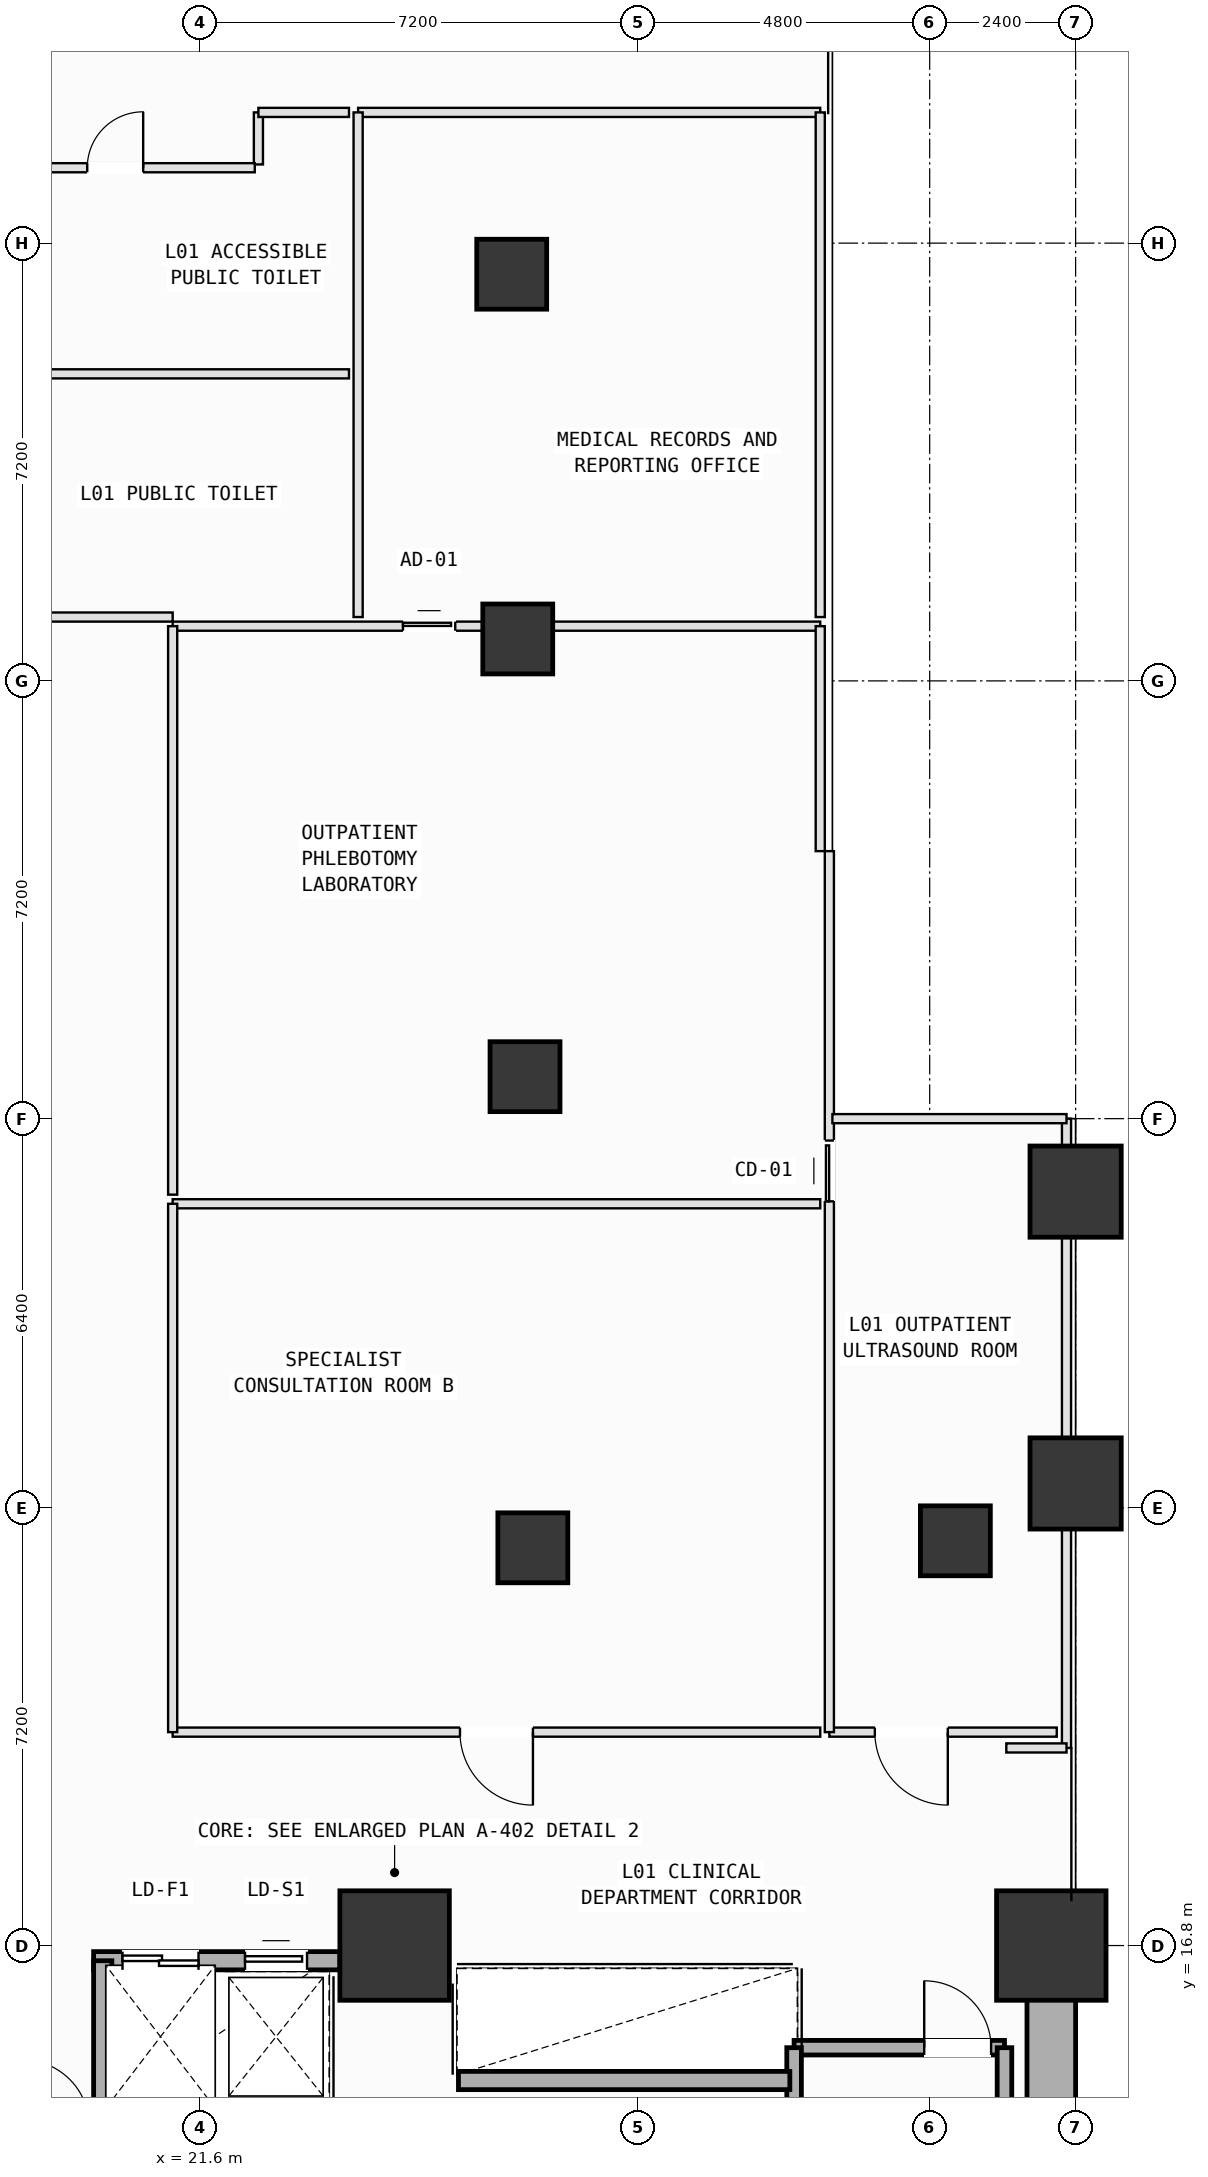
"""IFC4 building model, lengths in metres.
Left out: names, types, materials, properties, quantities, classifications, styles, units other than length and angle.
Written with IfcOpenShell. Run it as: python <this file> out.ifc"""

import sys

from ifc_helpers import new_model, si_unit, direction, frame, frame_2d, origin, origin_2d, place, context, subcontext, project, spatial, rectangle, extrude, element, fill, save


model = new_model("IFC4")
c1 = context("Model", 3, precision=1e-05, world=origin(), true_north=direction((0.0, 1.0)))
c2 = subcontext(c1, "Body", "Model", "MODEL_VIEW")
j1 = project(units=[si_unit("LENGTHUNIT", "METRE"), si_unit("PLANEANGLEUNIT", "RADIAN")], contexts=[c1])
p1 = place(None, origin())
s1 = spatial("IfcSite", under=j1, at=p1, CompositionType="ELEMENT")
p2 = place(p1, origin())
s2 = spatial("IfcBuilding", under=s1, at=p2, CompositionType="ELEMENT")
p3 = place(p2, frame((0.0, 0.0, 5.4)))
s3 = spatial("IfcBuildingStorey", under=s2, at=p3, CompositionType="ELEMENT", Elevation=5.4)
for number, where, z_axis, x_axis in (
    (1, (24.8, 16.8, 0.0), (0.0, 0.0, 1.0), (1.0, 0.0, 0.0)),
    (2, (35.6, 16.8, 0.0), (0.0, 0.0, 1.0), (1.0, 0.0, 0.0)),
):
    element("IfcColumn", number, at=place(p3, frame(where, z_axis=z_axis, x_axis=x_axis)), inside=s3, PredefinedType="COLUMN", context=c2, shape_type="SweptSolid", body=[
        extrude(rectangle(XDim=1.8, YDim=1.8, at=origin_2d()), origin(), (0.0, 0.0, 1.0), 5.4),
    ])
for number, where, z_axis, x_axis in (
    (3, (36.0, 24.4, 0.0), (0.0, 0.0, 1.0), (1.0, 0.0, 0.0)),
    (4, (36.0, 29.2, 0.0), (0.0, 0.0, 1.0), (1.0, 0.0, 0.0)),
):
    element("IfcColumn", number, at=place(p3, frame(where, z_axis=z_axis, x_axis=x_axis)), inside=s3, PredefinedType="PILASTER", context=c2, shape_type="SweptSolid", body=[
        extrude(rectangle(XDim=1.5, YDim=1.5, at=origin_2d()), origin(), (0.0, 0.0, 1.0), 5.4),
    ])
for number, where, z_axis, x_axis in (
    (5, (34.022, 23.457, 0.0), (0.0, 0.0, 1.0), (1.0, 0.0, 0.0)),
    (6, (27.073, 23.342, 0.0), (0.0, 0.0, 1.0), (1.0, 0.0, 0.0)),
    (7, (26.945, 31.091, 0.0), (0.0, 0.0, 1.0), (1.0, 0.0, 0.0)),
    (8, (26.825, 38.29, 0.0), (0.0, 0.0, 1.0), (1.0, 0.0, 0.0)),
    (9, (26.726, 44.289, 0.0), (0.0, 0.0, 1.0), (1.0, 0.0, 0.0)),
):
    element("IfcColumn", number, at=place(p3, frame(where, z_axis=z_axis, x_axis=x_axis)), inside=s3, PredefinedType="COLUMN", context=c2, shape_type="SweptSolid", body=[
        extrude(rectangle(XDim=1.15, YDim=1.15, at=origin_2d()), origin(), (0.0, 0.0, 1.0), 5.4),
    ])
p4 = place(p3, frame((31.37, 15.12, 0.0), z_axis=(0.0, 0.0, 1.0), x_axis=(1.0, 0.0, 0.0)))
e10 = element("IfcWall", 10, at=p4, inside=s3, PredefinedType="SOLIDWALL", context=c2, shape_type="SweptSolid", body=[
    extrude(rectangle(XDim=3.46, YDim=0.24, at=frame_2d((1.73, 0.0))), origin(), (0.0, 0.0, 1.0), 5.15),
])
p5 = place(p4, frame((2.14, 0.0, 0.0)))
e11 = element("IfcOpeningElement", 11, at=p5, cuts=e10, PredefinedType="OPENING", context=c2, shape_type="SweptSolid", body=[
    extrude(rectangle(XDim=1.1, YDim=2.15, at=frame_2d((0.55, 1.075))), frame((0.0, 0.13, 0.0), z_axis=(0.0, -1.0, 0.0), x_axis=(1.0, 0.0, 0.0)), (0.0, 0.0, 1.0), 0.26),
])
for number, where, z_axis, x_axis in (
    (12, (34.83, 15.12, 0.0), (0.0, 0.0, 1.0), (0.0, -1.0, 0.0)),
    (13, (31.37, 8.2, 0.0), (0.0, 0.0, 1.0), (0.0, 1.0, 0.0)),
):
    element("IfcWall", number, at=place(p3, frame(where, z_axis=z_axis, x_axis=x_axis)), inside=s3, PredefinedType="SOLIDWALL", context=c2, shape_type="SweptSolid", body=[
        extrude(rectangle(XDim=6.92, YDim=0.24, at=frame_2d((3.46, 0.0))), origin(), (0.0, 0.0, 1.0), 5.15),
    ])
p6 = place(p3, frame((35.6, 7.8, 0.0), z_axis=(0.0, 0.0, 1.0), x_axis=(0.0, 1.0, 0.0)))
e14 = element("IfcWall", 14, at=p6, inside=s3, PredefinedType="SHEAR", context=c2, shape_type="SweptSolid", body=[
    extrude(rectangle(XDim=9.0, YDim=0.8, at=frame_2d((4.5, 0.0))), origin(), (0.0, 0.0, 1.0), 5.15),
])
p7 = place(p3, frame((19.85, 16.55, 0.0), z_axis=(0.0, 0.0, 1.0), x_axis=(1.0, 0.0, 0.0)))
e15 = element("IfcWall", 15, at=p7, inside=s3, PredefinedType="SOLIDWALL", context=c2, shape_type="SweptSolid", body=[
    extrude(rectangle(XDim=4.05, YDim=0.3, at=frame_2d((2.025, 0.0))), origin(), (0.0, 0.0, 1.0), 5.15),
])
p8 = place(p7, frame((0.475, 0.0, 0.0)))
e16 = element("IfcOpeningElement", 16, at=p8, cuts=e15, PredefinedType="OPENING", context=c2, shape_type="SweptSolid", body=[
    extrude(rectangle(XDim=1.25, YDim=2.18, at=frame_2d((0.625, 1.09))), frame((0.0, 0.16, 0.0), z_axis=(0.0, -1.0, 0.0), x_axis=(1.0, 0.0, 0.0)), (0.0, 0.0, 1.0), 0.32),
])
p9 = place(p7, frame((2.49, 0.0, 0.0)))
e17 = element("IfcOpeningElement", 17, at=p9, cuts=e15, PredefinedType="OPENING", context=c2, shape_type="SweptSolid", body=[
    extrude(rectangle(XDim=1.02, YDim=2.12, at=frame_2d((0.51, 1.06))), frame((0.0, 0.16, 0.0), z_axis=(0.0, -1.0, 0.0), x_axis=(1.0, 0.0, 0.0)), (0.0, 0.0, 1.0), 0.32),
])
p10 = place(p3, frame((20.0, 13.82, 0.0), z_axis=(0.0, 0.0, 1.0), x_axis=(0.0, 1.0, 0.0)))
e18 = element("IfcWall", 18, at=p10, inside=s3, PredefinedType="SOLIDWALL", context=c2, shape_type="SweptSolid", body=[
    extrude(rectangle(XDim=2.73, YDim=0.3, at=frame_2d((1.365, 0.0))), origin(), (0.0, 0.0, 1.0), 5.15),
])
p11 = place(p3, frame((25.85, 14.58, 0.0), z_axis=(0.0, 0.0, 1.0), x_axis=(1.0, 0.0, 0.0)))
e19 = element("IfcWall", 19, at=p11, inside=s3, PredefinedType="SOLIDWALL", context=c2, shape_type="SweptSolid", body=[
    extrude(rectangle(XDim=5.45, YDim=0.3, at=frame_2d((2.725, 0.0))), origin(), (0.0, 0.0, 1.0), 5.15),
])
p12 = place(p3, frame((35.85, 30.4, 0.0), z_axis=(0.0, 0.0, 1.0), x_axis=(0.0, -1.0, 0.0)))
e20 = element("IfcWall", 20, at=p12, inside=s3, PredefinedType="PARTITIONING", context=c2, shape_type="SweptSolid", body=[
    extrude(rectangle(XDim=10.35, YDim=0.15, at=frame_2d((5.175, 0.0))), origin(), (0.0, 0.0, 1.0), 4.235),
])
p13 = place(p3, frame((35.85, 20.05, 0.0), z_axis=(0.0, 0.0, 1.0), x_axis=(-1.0, 0.0, 0.0)))
e21 = element("IfcWall", 21, at=p13, inside=s3, PredefinedType="PARTITIONING", context=c2, shape_type="SweptSolid", body=[
    extrude(rectangle(XDim=0.99, YDim=0.15, at=frame_2d((0.495, 0.0))), origin(), (0.0, 0.0, 1.0), 5.15),
])
p14 = place(p3, frame((35.69, 20.31, 0.0), z_axis=(0.0, 0.0, 1.0), x_axis=(-1.0, 0.0, 0.0)))
e22 = element("IfcWall", 22, at=p14, inside=s3, PredefinedType="PARTITIONING", context=c2, shape_type="SweptSolid", body=[
    extrude(rectangle(XDim=3.74, YDim=0.15, at=frame_2d((1.87, 0.0))), origin(), (0.0, 0.0, 1.0), 5.15),
])
p15 = place(p14, frame((1.792, 0.0, 0.0)))
e23 = element("IfcOpeningElement", 23, at=p15, cuts=e22, PredefinedType="OPENING", context=c2, shape_type="SweptSolid", body=[
    extrude(rectangle(XDim=1.2, YDim=2.15, at=frame_2d((0.6, 1.075))), frame((0.0, 0.085, 0.0), z_axis=(0.0, -1.0, 0.0), x_axis=(1.0, 0.0, 0.0)), (0.0, 0.0, 1.0), 0.17),
])
p16 = place(p3, frame((31.95, 20.31, 0.0), z_axis=(0.0, 0.0, 1.0), x_axis=(0.0, 1.0, 0.0)))
e24 = element("IfcWall", 24, at=p16, inside=s3, PredefinedType="PARTITIONING", context=c2, shape_type="SweptSolid", body=[
    extrude(rectangle(XDim=14.49, YDim=0.15, at=frame_2d((7.245, 0.0))), origin(), (0.0, 0.0, 1.0), 5.15),
])
p17 = place(p16, frame((8.73, 0.0, 0.0)))
e25 = element("IfcOpeningElement", 25, at=p17, cuts=e24, PredefinedType="OPENING", context=c2, shape_type="SweptSolid", body=[
    extrude(rectangle(XDim=1.0, YDim=2.12, at=frame_2d((0.5, 1.06))), frame((0.0, 0.085, 0.0), z_axis=(0.0, -1.0, 0.0), x_axis=(1.0, 0.0, 0.0)), (0.0, 0.0, 1.0), 0.17),
])
p18 = place(p3, frame((32.0, 30.4, 0.0), z_axis=(0.0, 0.0, 1.0), x_axis=(1.0, 0.0, 0.0)))
e26 = element("IfcWall", 26, at=p18, inside=s3, PredefinedType="PARTITIONING", context=c2, shape_type="SweptSolid", body=[
    extrude(rectangle(XDim=3.85, YDim=0.15, at=frame_2d((1.925, 0.0))), origin(), (0.0, 0.0, 1.0), 4.235),
])
p19 = place(p3, frame((21.15, 29.0, 0.0), z_axis=(0.0, 0.0, 1.0), x_axis=(1.0, 0.0, 0.0)))
e27 = element("IfcWall", 27, at=p19, inside=s3, PredefinedType="PARTITIONING", context=c2, shape_type="SweptSolid", body=[
    extrude(rectangle(XDim=10.65, YDim=0.15, at=frame_2d((5.325, 0.0))), origin(), (0.0, 0.0, 1.0), 5.15),
])
p20 = place(p3, frame((31.8, 20.31, 0.0), z_axis=(0.0, 0.0, 1.0), x_axis=(-1.0, 0.0, 0.0)))
e28 = element("IfcWall", 28, at=p20, inside=s3, PredefinedType="PARTITIONING", context=c2, shape_type="SweptSolid", body=[
    extrude(rectangle(XDim=10.65, YDim=0.15, at=frame_2d((5.325, 0.0))), origin(), (0.0, 0.0, 1.0), 5.15),
])
p21 = place(p20, frame((4.725, 0.0, 0.0)))
e29 = element("IfcOpeningElement", 29, at=p21, cuts=e28, PredefinedType="OPENING", context=c2, shape_type="SweptSolid", body=[
    extrude(rectangle(XDim=1.2, YDim=2.15, at=frame_2d((0.6, 1.075))), frame((0.0, 0.085, 0.0), z_axis=(0.0, -1.0, 0.0), x_axis=(1.0, 0.0, 0.0)), (0.0, 0.0, 1.0), 0.17),
])
p22 = place(p3, frame((21.15, 20.31, 0.0), z_axis=(0.0, 0.0, 1.0), x_axis=(0.0, 1.0, 0.0)))
e30 = element("IfcWall", 30, at=p22, inside=s3, PredefinedType="PARTITIONING", context=c2, shape_type="SweptSolid", body=[
    extrude(rectangle(XDim=8.69, YDim=0.15, at=frame_2d((4.345, 0.0))), origin(), (0.0, 0.0, 1.0), 5.15),
])
p23 = place(p3, frame((21.15, 38.5, 0.0), z_axis=(0.0, 0.0, 1.0), x_axis=(1.0, 0.0, 0.0)))
e31 = element("IfcWall", 31, at=p23, inside=s3, PredefinedType="PARTITIONING", context=c2, shape_type="SweptSolid", body=[
    extrude(rectangle(XDim=10.65, YDim=0.15, at=frame_2d((5.325, 0.0))), origin(), (0.0, 0.0, 1.0), 5.15),
])
p24 = place(p23, frame((3.787, 0.0, 0.0)))
e32 = element("IfcOpeningElement", 32, at=p24, cuts=e31, PredefinedType="OPENING", context=c2, shape_type="SweptSolid", body=[
    extrude(rectangle(XDim=0.86, YDim=2.06, at=frame_2d((0.43, 1.03))), frame((0.0, 0.085, 0.0), z_axis=(0.0, -1.0, 0.0), x_axis=(1.0, 0.0, 0.0)), (0.0, 0.0, 1.0), 0.17),
])
p25 = place(p3, frame((31.8, 38.5, 0.0), z_axis=(0.0, 0.0, 1.0), x_axis=(0.0, -1.0, 0.0)))
e33 = element("IfcWall", 33, at=p25, inside=s3, PredefinedType="PARTITIONING", context=c2, shape_type="SweptSolid", body=[
    extrude(rectangle(XDim=3.7, YDim=0.15, at=frame_2d((1.85, 0.0))), origin(), (0.0, 0.0, 1.0), 5.15),
])
p26 = place(p3, frame((21.15, 29.15, 0.0), z_axis=(0.0, 0.0, 1.0), x_axis=(0.0, 1.0, 0.0)))
e34 = element("IfcWall", 34, at=p26, inside=s3, PredefinedType="PARTITIONING", context=c2, shape_type="SweptSolid", body=[
    extrude(rectangle(XDim=9.35, YDim=0.15, at=frame_2d((4.675, 0.0))), origin(), (0.0, 0.0, 1.0), 5.15),
])
p27 = place(p3, frame((24.2, 46.95, 0.0), z_axis=(0.0, 0.0, 1.0), x_axis=(1.0, 0.0, 0.0)))
e35 = element("IfcWall", 35, at=p27, inside=s3, PredefinedType="PARTITIONING", context=c2, shape_type="SweptSolid", body=[
    extrude(rectangle(XDim=7.6, YDim=0.15, at=frame_2d((3.8, 0.0))), origin(), (0.0, 0.0, 1.0), 5.15),
])
for number, where, z_axis, x_axis in (
    (36, (31.8, 46.95, 0.0), (0.0, 0.0, 1.0), (0.0, -1.0, 0.0)),
    (37, (24.2, 38.65, 0.0), (0.0, 0.0, 1.0), (0.0, 1.0, 0.0)),
):
    element("IfcWall", number, at=place(p3, frame(where, z_axis=z_axis, x_axis=x_axis)), inside=s3, PredefinedType="PARTITIONING", context=c2, shape_type="SweptSolid", body=[
        extrude(rectangle(XDim=8.3, YDim=0.15, at=frame_2d((4.15, 0.0))), origin(), (0.0, 0.0, 1.0), 5.15),
    ])
p28 = place(p3, frame((21.15, 38.65, 0.0), z_axis=(0.0, 0.0, 1.0), x_axis=(-1.0, 0.0, 0.0)))
e38 = element("IfcWall", 38, at=p28, inside=s3, PredefinedType="PARTITIONING", context=c2, shape_type="SweptSolid", body=[
    extrude(rectangle(XDim=3.24, YDim=0.15, at=frame_2d((1.62, 0.0))), origin(), (0.0, 0.0, 1.0), 5.15),
])
p29 = place(p3, frame((17.91, 42.65, 0.0), z_axis=(0.0, 0.0, 1.0), x_axis=(1.0, 0.0, 0.0)))
e39 = element("IfcWall", 39, at=p29, inside=s3, PredefinedType="PARTITIONING", context=c2, shape_type="SweptSolid", body=[
    extrude(rectangle(XDim=6.14, YDim=0.15, at=frame_2d((3.07, 0.0))), origin(), (0.0, 0.0, 1.0), 5.15),
])
p30 = place(p3, frame((22.56, 46.094, 0.0), z_axis=(0.0, 0.0, 1.0), x_axis=(0.0, 1.0, 0.0)))
e40 = element("IfcWall", 40, at=p30, inside=s3, PredefinedType="PARTITIONING", context=c2, shape_type="SweptSolid", body=[
    extrude(rectangle(XDim=0.856, YDim=0.15, at=frame_2d((0.428, 0.0))), origin(), (0.0, 0.0, 1.0), 5.15),
])
p31 = place(p3, frame((22.56, 46.95, 0.0), z_axis=(0.0, 0.0, 1.0), x_axis=(1.0, 0.0, 0.0)))
e41 = element("IfcWall", 41, at=p31, inside=s3, PredefinedType="PARTITIONING", context=c2, shape_type="SweptSolid", body=[
    extrude(rectangle(XDim=1.49, YDim=0.15, at=frame_2d((0.745, 0.0))), origin(), (0.0, 0.0, 1.0), 5.15),
])
p32 = place(p3, frame((17.91, 46.04, 0.0), z_axis=(0.0, 0.0, 1.0), x_axis=(1.0, 0.0, 0.0)))
e42 = element("IfcWall", 42, at=p32, inside=s3, PredefinedType="PARTITIONING", context=c2, shape_type="SweptSolid", body=[
    extrude(rectangle(XDim=4.59, YDim=0.15, at=frame_2d((2.295, 0.0))), origin(), (0.0, 0.0, 1.0), 5.15),
])
p33 = place(p32, frame((1.835, 0.0, 0.0)))
e43 = element("IfcOpeningElement", 43, at=p33, cuts=e42, PredefinedType="OPENING", context=c2, shape_type="SweptSolid", body=[
    extrude(rectangle(XDim=0.92, YDim=2.1, at=frame_2d((0.46, 1.05))), frame((0.0, 0.085, 0.0), z_axis=(0.0, -1.0, 0.0), x_axis=(1.0, 0.0, 0.0)), (0.0, 0.0, 1.0), 0.17),
])
p34 = place(p5, origin())
e44 = element("IfcDoor", 44, at=p34, inside=s3, OperationType="SINGLE_SWING_LEFT", PredefinedType="DOOR", context=c2, shape_type="SweptSolid", body=[
    extrude(rectangle(XDim=1.1, YDim=2.15, at=frame_2d((0.55, 1.075))), frame((0.0, 0.025, 0.0), z_axis=(0.0, -1.0, 0.0), x_axis=(1.0, 0.0, 0.0)), (0.0, 0.0, 1.0), 0.05),
])
fill(e11, e44)
p35 = place(p8, origin())
e45 = element("IfcDoor", 45, at=p35, inside=s3, OperationType="DOUBLE_DOOR_SLIDING", PredefinedType="DOOR", context=c2, shape_type="SweptSolid", body=[
    extrude(rectangle(XDim=1.25, YDim=2.18, at=frame_2d((0.625, 1.09))), frame((0.0, 0.025, 0.0), z_axis=(0.0, -1.0, 0.0), x_axis=(1.0, 0.0, 0.0)), (0.0, 0.0, 1.0), 0.05),
])
fill(e16, e45)
p36 = place(p9, origin())
e46 = element("IfcDoor", 46, at=p36, inside=s3, OperationType="SLIDING_TO_LEFT", PredefinedType="DOOR", context=c2, shape_type="SweptSolid", body=[
    extrude(rectangle(XDim=1.02, YDim=2.12, at=frame_2d((0.51, 1.06))), frame((0.0, 0.025, 0.0), z_axis=(0.0, -1.0, 0.0), x_axis=(1.0, 0.0, 0.0)), (0.0, 0.0, 1.0), 0.05),
])
fill(e17, e46)
p37 = place(p15, origin())
e47 = element("IfcDoor", 47, at=p37, inside=s3, OperationType="SINGLE_SWING_LEFT", PredefinedType="DOOR", context=c2, shape_type="SweptSolid", body=[
    extrude(rectangle(XDim=1.2, YDim=2.15, at=frame_2d((0.6, 1.075))), frame((0.0, 0.025, 0.0), z_axis=(0.0, -1.0, 0.0), x_axis=(1.0, 0.0, 0.0)), (0.0, 0.0, 1.0), 0.05),
])
fill(e23, e47)
p38 = place(p21, origin())
e48 = element("IfcDoor", 48, at=p38, inside=s3, OperationType="SINGLE_SWING_LEFT", PredefinedType="DOOR", context=c2, shape_type="SweptSolid", body=[
    extrude(rectangle(XDim=1.2, YDim=2.15, at=frame_2d((0.6, 1.075))), frame((0.0, 0.025, 0.0), z_axis=(0.0, -1.0, 0.0), x_axis=(1.0, 0.0, 0.0)), (0.0, 0.0, 1.0), 0.05),
])
fill(e29, e48)
p39 = place(p33, origin())
e49 = element("IfcDoor", 49, at=p39, inside=s3, OperationType="SINGLE_SWING_RIGHT", PredefinedType="DOOR", context=c2, shape_type="SweptSolid", body=[
    extrude(rectangle(XDim=0.92, YDim=2.1, at=frame_2d((0.46, 1.05))), frame((0.0, 0.025, 0.0), z_axis=(0.0, -1.0, 0.0), x_axis=(1.0, 0.0, 0.0)), (0.0, 0.0, 1.0), 0.05),
])
fill(e43, e49)
p40 = place(p17, origin())
e50 = element("IfcDoor", 50, at=p40, inside=s3, OperationType="SLIDING_TO_LEFT", PredefinedType="DOOR", context=c2, shape_type="SweptSolid", body=[
    extrude(rectangle(XDim=1.0, YDim=2.12, at=frame_2d((0.5, 1.06))), frame((0.0, 0.025, 0.0), z_axis=(0.0, -1.0, 0.0), x_axis=(1.0, 0.0, 0.0)), (0.0, 0.0, 1.0), 0.05),
])
fill(e25, e50)
p41 = place(p24, origin())
e51 = element("IfcDoor", 51, at=p41, inside=s3, OperationType="SLIDING_TO_LEFT", PredefinedType="DOOR", context=c2, shape_type="SweptSolid", body=[
    extrude(rectangle(XDim=0.86, YDim=2.06, at=frame_2d((0.43, 1.03))), frame((0.0, 0.025, 0.0), z_axis=(0.0, -1.0, 0.0), x_axis=(1.0, 0.0, 0.0)), (0.0, 0.0, 1.0), 0.05),
])
fill(e32, e51)
save(model, sys.argv[1])
